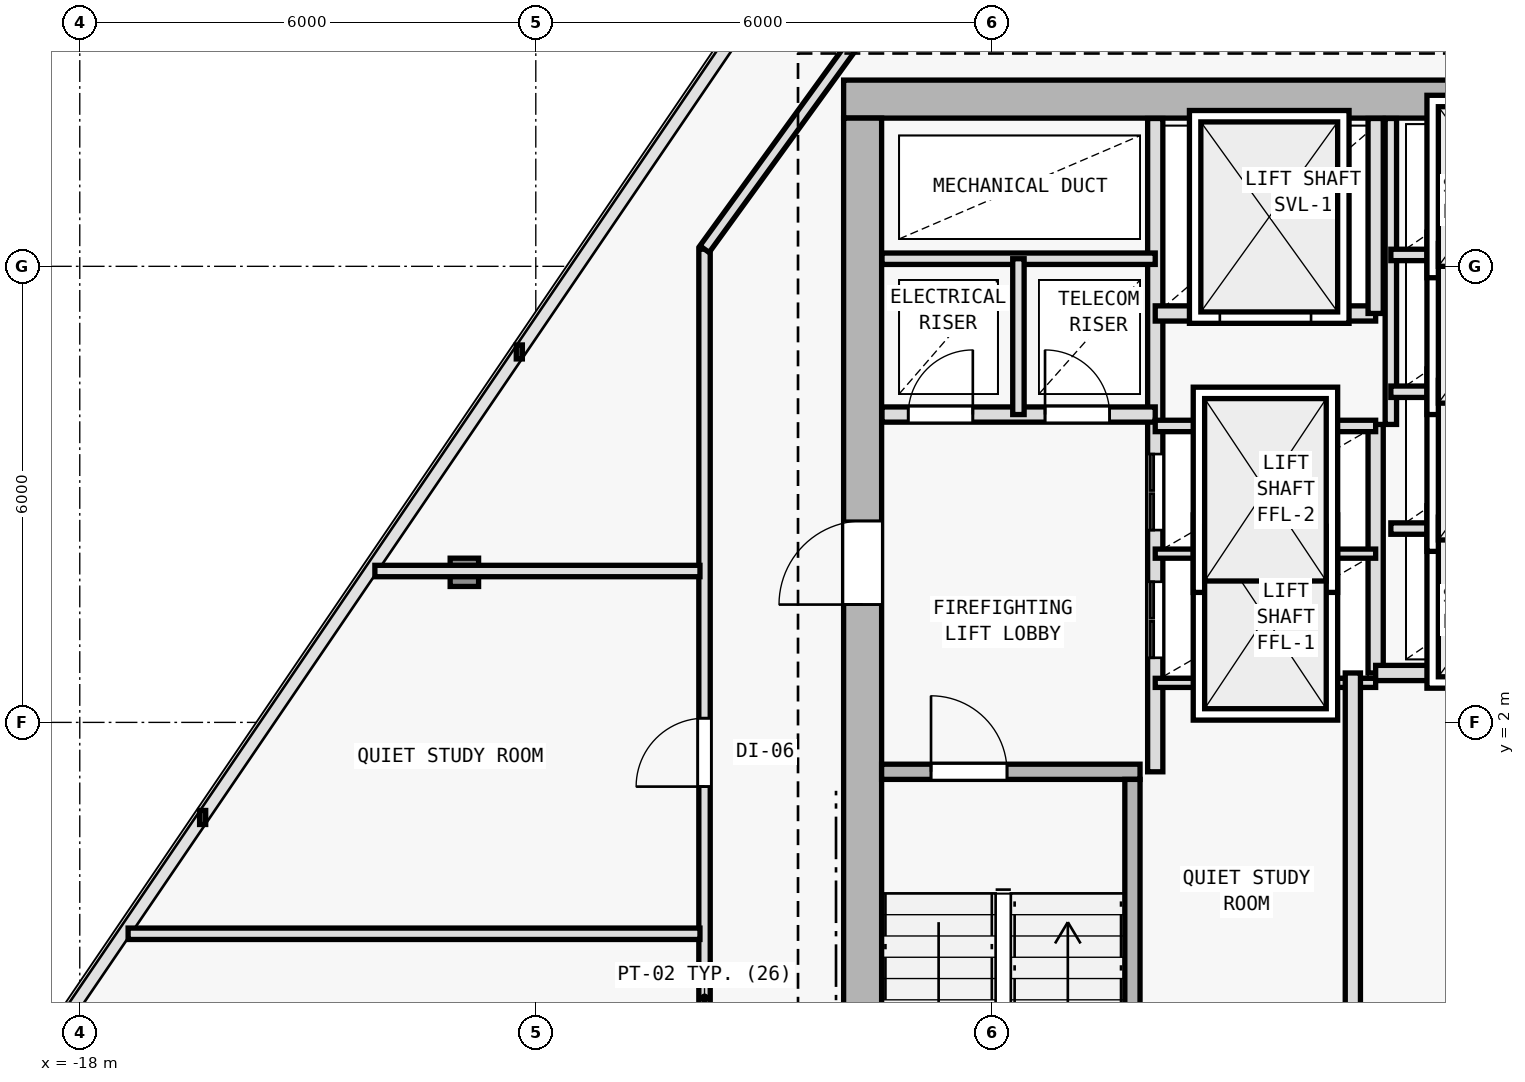
"""IFC4 building model, lengths in metres.
Left out: names, types, materials, properties, quantities, classifications, styles, units other than length and angle.
Written with IfcOpenShell. Run it as: python <this file> out.ifc"""

import sys

from ifc_helpers import new_model, si_unit, direction, frame, frame_2d, origin, origin_2d, place, context, subcontext, project, spatial, rectangle, i_section, extrude, element, fill, save


model = new_model("IFC4")
c1 = context("Model", 3, precision=1e-05, world=origin(), true_north=direction((0.0, 1.0)))
c2 = subcontext(c1, "Body", "Model", "MODEL_VIEW")
j1 = project(units=[si_unit("LENGTHUNIT", "METRE"), si_unit("PLANEANGLEUNIT", "RADIAN")], contexts=[c1])
p1 = place(None, origin())
s1 = spatial("IfcSite", under=j1, at=p1, CompositionType="ELEMENT")
p2 = place(p1, origin())
s2 = spatial("IfcBuilding", under=s1, at=p2, CompositionType="ELEMENT")
p3 = place(p2, frame((0.0, 0.0, 223.5)))
s3 = spatial("IfcBuildingStorey", under=s2, at=p3, CompositionType="ELEMENT", Elevation=223.5)
for number, where, z_axis, x_axis in (
    (1, (-7.7, 10.2, 0.0), (0.0, 0.0, 1.0), (1.0, 0.0, 0.0)),
    (2, (-7.7, 2.0, 0.0), (0.0, 0.0, 1.0), (1.0, 0.0, 0.0)),
):
    element("IfcColumn", number, at=place(p3, frame(where, z_axis=z_axis, x_axis=x_axis)), inside=s3, PredefinedType="COLUMN", context=c2, shape_type="SweptSolid", body=[
        extrude(i_section(OverallWidth=0.398, OverallDepth=0.387, WebThickness=0.013, FlangeThickness=0.022, FilletRadius=0.015, at=origin_2d()), origin(), (0.0, 0.0, 1.0), 3.6),
    ])
p4 = place(p3, frame((-12.94, 3.974, 0.006), z_axis=(0.017003572908, 0.009522000828, 0.999810086971), x_axis=(-0.488603368932, 0.87250601595, 0.0)))
e3 = element("IfcColumn", 3, at=p4, inside=s3, PredefinedType="COLUMN", context=c2, shape_type="SweptSolid", body=[
    extrude(i_section(OverallWidth=0.374, OverallDepth=0.372, WebThickness=0.012, FlangeThickness=0.02, FilletRadius=0.015, at=origin_2d()), origin(), (0.0, 0.0, 1.0), 3.59),
])
p5 = place(p3, frame((7.95, 10.2, 0.0), z_axis=(0.0, 0.0, 1.0), x_axis=(-1.0, 0.0, 0.0)))
e4 = element("IfcWall", 4, at=p5, inside=s3, PredefinedType="SHEAR", context=c2, shape_type="SweptSolid", body=[
    extrude(rectangle(XDim=15.9, YDim=0.5, at=frame_2d((7.95, 0.0))), origin(), (0.0, 0.0, 1.0), 3.35),
])
p6 = place(p5, frame((4.4, 0.0, 0.0)))
e5 = element("IfcOpeningElement", 5, at=p6, cuts=e4, PredefinedType="OPENING", context=c2, shape_type="SweptSolid", body=[
    extrude(rectangle(XDim=1.1, YDim=2.15, at=frame_2d((0.55, 1.075))), frame((0.0, 0.26, 0.0), z_axis=(0.0, -1.0, 0.0), x_axis=(1.0, 0.0, 0.0)), (0.0, 0.0, 1.0), 0.52),
])
p7 = place(p3, frame((-7.7, -9.15, 0.0), z_axis=(0.0, 0.0, 1.0), x_axis=(0.0, 1.0, 0.0)))
e6 = element("IfcWall", 6, at=p7, inside=s3, PredefinedType="SHEAR", context=c2, shape_type="SweptSolid", body=[
    extrude(rectangle(XDim=19.1, YDim=0.5, at=frame_2d((9.55, 0.0))), origin(), (0.0, 0.0, 1.0), 3.35),
])
p8 = place(p7, frame((12.7, 0.0, 0.0)))
e7 = element("IfcOpeningElement", 7, at=p8, cuts=e6, PredefinedType="OPENING", context=c2, shape_type="SweptSolid", body=[
    extrude(rectangle(XDim=1.1, YDim=2.15, at=frame_2d((0.55, 1.075))), frame((0.0, 0.26, 0.0), z_axis=(0.0, -1.0, 0.0), x_axis=(1.0, 0.0, 0.0)), (0.0, 0.0, 1.0), 0.52),
])
p9 = place(p3, frame((-7.45, 1.35, 0.0), z_axis=(0.0, 0.0, 1.0), x_axis=(1.0, 0.0, 0.0)))
e8 = element("IfcWall", 8, at=p9, inside=s3, PredefinedType="SOLIDWALL", context=c2, shape_type="SweptSolid", body=[
    extrude(rectangle(XDim=3.4, YDim=0.2, at=frame_2d((1.7, 0.0))), origin(), (0.0, 0.0, 1.0), 3.35),
])
p10 = place(p9, frame((0.65, 0.0, 0.0)))
e9 = element("IfcOpeningElement", 9, at=p10, cuts=e8, PredefinedType="OPENING", context=c2, shape_type="SweptSolid", body=[
    extrude(rectangle(XDim=1.0, YDim=2.15, at=frame_2d((0.5, 1.075))), frame((0.0, 0.11, 0.0), z_axis=(0.0, -1.0, 0.0), x_axis=(1.0, 0.0, 0.0)), (0.0, 0.0, 1.0), 0.22),
])
p11 = place(p3, frame((-4.15, -5.95, 0.0), z_axis=(0.0, 0.0, 1.0), x_axis=(0.0, 1.0, 0.0)))
e10 = element("IfcWall", 10, at=p11, inside=s3, PredefinedType="SOLIDWALL", context=c2, shape_type="SweptSolid", body=[
    extrude(rectangle(XDim=7.2, YDim=0.2, at=frame_2d((3.6, 0.0))), origin(), (0.0, 0.0, 1.0), 3.35),
])
p12 = place(p3, frame((-3.85, 1.35, 0.0), z_axis=(0.0, 0.0, 1.0), x_axis=(0.0, 1.0, 0.0)))
e11 = element("IfcWall", 11, at=p12, inside=s3, PredefinedType="SOLIDWALL", context=c2, shape_type="SweptSolid", body=[
    extrude(rectangle(XDim=8.595, YDim=0.2, at=frame_2d((4.297, 0.0))), origin(), (0.0, 0.0, 1.0), 3.35),
])
p13 = place(p12, frame((1.5, 0.0, 0.0)))
e12 = element("IfcOpeningElement", 12, at=p13, cuts=e11, PredefinedType="OPENING", context=c2, shape_type="SweptSolid", body=[
    extrude(rectangle(XDim=1.0, YDim=2.15, at=frame_2d((0.5, 1.075))), frame((0.0, 0.11, 0.0), z_axis=(0.0, -1.0, 0.0), x_axis=(1.0, 0.0, 0.0)), (0.0, 0.0, 1.0), 0.22),
])
p14 = place(p12, frame((3.18, 0.0, 0.0)))
e13 = element("IfcOpeningElement", 13, at=p14, cuts=e11, PredefinedType="OPENING", context=c2, shape_type="SweptSolid", body=[
    extrude(rectangle(XDim=1.0, YDim=2.15, at=frame_2d((0.5, 1.075))), frame((0.0, 0.11, 0.0), z_axis=(0.0, -1.0, 0.0), x_axis=(1.0, 0.0, 0.0)), (0.0, 0.0, 1.0), 0.22),
])
p15 = place(p3, frame((-7.445, 6.05, 0.0), z_axis=(0.0, 0.0, 1.0), x_axis=(1.0, 0.0, 0.0)))
e14 = element("IfcWall", 14, at=p15, inside=s3, PredefinedType="SOLIDWALL", context=c2, shape_type="SweptSolid", body=[
    extrude(rectangle(XDim=3.595, YDim=0.2, at=frame_2d((1.797, 0.0))), origin(), (0.0, 0.0, 1.0), 3.35),
])
p16 = place(p15, frame((0.345, 0.0, 0.0)))
e15 = element("IfcOpeningElement", 15, at=p16, cuts=e14, PredefinedType="OPENING", context=c2, shape_type="SweptSolid", body=[
    extrude(rectangle(XDim=0.85, YDim=2.1, at=frame_2d((0.425, 1.05))), frame((0.0, 0.11, 0.0), z_axis=(0.0, -1.0, 0.0), x_axis=(1.0, 0.0, 0.0)), (0.0, 0.0, 1.0), 0.22),
])
p17 = place(p15, frame((2.145, 0.0, 0.0)))
e16 = element("IfcOpeningElement", 16, at=p17, cuts=e14, PredefinedType="OPENING", context=c2, shape_type="SweptSolid", body=[
    extrude(rectangle(XDim=0.85, YDim=2.1, at=frame_2d((0.425, 1.05))), frame((0.0, 0.11, 0.0), z_axis=(0.0, -1.0, 0.0), x_axis=(1.0, 0.0, 0.0)), (0.0, 0.0, 1.0), 0.22),
])
p18 = place(p3, frame((-7.445, 8.1, 0.0), z_axis=(0.0, 0.0, 1.0), x_axis=(1.0, 0.0, 0.0)))
e17 = element("IfcWall", 17, at=p18, inside=s3, PredefinedType="PARTITIONING", context=c2, shape_type="SweptSolid", body=[
    extrude(rectangle(XDim=3.595, YDim=0.15, at=frame_2d((1.797, 0.0))), origin(), (0.0, 0.0, 1.0), 3.35),
])
p19 = place(p3, frame((-5.65, 6.05, 0.0), z_axis=(0.0, 0.0, 1.0), x_axis=(0.0, 1.0, 0.0)))
e18 = element("IfcWall", 18, at=p19, inside=s3, PredefinedType="PARTITIONING", context=c2, shape_type="SweptSolid", body=[
    extrude(rectangle(XDim=2.05, YDim=0.15, at=frame_2d((1.025, 0.0))), origin(), (0.0, 0.0, 1.0), 3.35),
])
p20 = place(p3, frame((-0.95, 2.65, 0.0), z_axis=(0.0, 0.0, 1.0), x_axis=(0.0, 1.0, 0.0)))
e19 = element("IfcWall", 19, at=p20, inside=s3, PredefinedType="SOLIDWALL", context=c2, shape_type="SweptSolid", body=[
    extrude(rectangle(XDim=3.27, YDim=0.2, at=frame_2d((1.635, 0.0))), origin(), (0.0, 0.0, 1.0), 3.35),
])
for number, where, z_axis, x_axis in (
    (20, (-3.85, 2.52, 0.0), (0.0, 0.0, 1.0), (1.0, 0.0, 0.0)),
    (21, (-3.85, 4.22, 0.0), (0.0, 0.0, 1.0), (1.0, 0.0, 0.0)),
):
    element("IfcWall", number, at=place(p3, frame(where, z_axis=z_axis, x_axis=x_axis)), inside=s3, PredefinedType="PARTITIONING", context=c2, shape_type="SweptSolid", body=[
        extrude(rectangle(XDim=2.9, YDim=0.12, at=frame_2d((1.45, 0.0))), origin(), (0.0, 0.0, 1.0), 3.35),
    ])
p21 = place(p3, frame((-3.85, 5.9, 0.0), z_axis=(0.0, 0.0, 1.0), x_axis=(1.0, 0.0, 0.0)))
e22 = element("IfcWall", 22, at=p21, inside=s3, PredefinedType="PARTITIONING", context=c2, shape_type="SweptSolid", body=[
    extrude(rectangle(XDim=2.9, YDim=0.15, at=frame_2d((1.45, 0.0))), origin(), (0.0, 0.0, 1.0), 3.35),
])
p22 = place(p3, frame((-3.85, 7.38, 0.0), z_axis=(0.0, 0.0, 1.0), x_axis=(1.0, 0.0, 0.0)))
e23 = element("IfcWall", 23, at=p22, inside=s3, PredefinedType="SOLIDWALL", context=c2, shape_type="SweptSolid", body=[
    extrude(rectangle(XDim=2.9, YDim=0.2, at=frame_2d((1.45, 0.0))), origin(), (0.0, 0.0, 1.0), 3.35),
])
p23 = place(p22, frame((0.85, 0.0, 0.0)))
e24 = element("IfcOpeningElement", 24, at=p23, cuts=e23, PredefinedType="OPENING", context=c2, shape_type="SweptSolid", body=[
    extrude(rectangle(XDim=1.2, YDim=2.2, at=frame_2d((0.6, 1.1))), frame((0.0, 0.11, 0.0), z_axis=(0.0, -1.0, 0.0), x_axis=(1.0, 0.0, 0.0)), (0.0, 0.0, 1.0), 0.22),
])
p24 = place(p3, frame((-0.95, 7.38, 0.0), z_axis=(0.0, 0.0, 1.0), x_axis=(0.0, 1.0, 0.0)))
e25 = element("IfcWall", 25, at=p24, inside=s3, PredefinedType="SOLIDWALL", context=c2, shape_type="SweptSolid", body=[
    extrude(rectangle(XDim=2.565, YDim=0.2, at=frame_2d((1.283, 0.0))), origin(), (0.0, 0.0, 1.0), 3.35),
])
p25 = place(p3, frame((-1.25, -6.05, 0.0), z_axis=(0.0, 0.0, 1.0), x_axis=(0.0, 1.0, 0.0)))
e26 = element("IfcWall", 26, at=p25, inside=s3, PredefinedType="SOLIDWALL", context=c2, shape_type="SweptSolid", body=[
    extrude(rectangle(XDim=8.7, YDim=0.2, at=frame_2d((4.35, 0.0))), origin(), (0.0, 0.0, 1.0), 3.35),
])
p26 = place(p25, frame((3.4, 0.0, 0.0)))
e27 = element("IfcOpeningElement", 27, at=p26, cuts=e26, PredefinedType="OPENING", context=c2, shape_type="SweptSolid", body=[
    extrude(rectangle(XDim=0.95, YDim=2.1, at=frame_2d((0.475, 1.05))), frame((0.0, 0.11, 0.0), z_axis=(0.0, -1.0, 0.0), x_axis=(1.0, 0.0, 0.0)), (0.0, 0.0, 1.0), 0.22),
])
p27 = place(p3, frame((-0.95, 2.65, 0.0), z_axis=(0.0, 0.0, 1.0), x_axis=(1.0, 0.0, 0.0)))
e28 = element("IfcWall", 28, at=p27, inside=s3, PredefinedType="SOLIDWALL", context=c2, shape_type="SweptSolid", body=[
    extrude(rectangle(XDim=2.9, YDim=0.2, at=frame_2d((1.45, 0.0))), origin(), (0.0, 0.0, 1.0), 3.35),
])
p28 = place(p3, frame((-0.75, 5.92, 0.0), z_axis=(0.0, 0.0, 1.0), x_axis=(0.0, 1.0, 0.0)))
e29 = element("IfcWall", 29, at=p28, inside=s3, PredefinedType="PARTITIONING", context=c2, shape_type="SweptSolid", body=[
    extrude(rectangle(XDim=4.025, YDim=0.15, at=frame_2d((2.013, 0.0))), origin(), (0.0, 0.0, 1.0), 3.35),
])
for number, where, z_axis, x_axis in (
    (30, (-0.75, 4.55, 0.0), (0.0, 0.0, 1.0), (1.0, 0.0, 0.0)),
    (31, (-0.75, 6.35, 0.0), (0.0, 0.0, 1.0), (1.0, 0.0, 0.0)),
    (32, (-0.75, 8.15, 0.0), (0.0, 0.0, 1.0), (1.0, 0.0, 0.0)),
):
    element("IfcWall", number, at=place(p3, frame(where, z_axis=z_axis, x_axis=x_axis)), inside=s3, PredefinedType="PARTITIONING", context=c2, shape_type="SweptSolid", body=[
        extrude(rectangle(XDim=2.7, YDim=0.15, at=frame_2d((1.35, 0.0))), origin(), (0.0, 0.0, 1.0), 3.35),
    ])
p29 = place(p3, frame((-9.78, -11.48, 0.0), z_axis=(0.0, 0.0, 1.0), x_axis=(0.0, 1.0, 0.0)))
e33 = element("IfcWall", 33, at=p29, inside=s3, PredefinedType="PARTITIONING", context=c2, shape_type="SweptSolid", body=[
    extrude(rectangle(XDim=19.706, YDim=0.15, at=frame_2d((9.853, 0.0))), origin(), (0.0, 0.0, 1.0), 2.825),
])
p30 = place(p29, frame((7.775, 0.0, 0.0)))
e34 = element("IfcOpeningElement", 34, at=p30, cuts=e33, PredefinedType="OPENING", context=c2, shape_type="SweptSolid", body=[
    extrude(rectangle(XDim=0.9, YDim=2.1, at=frame_2d((0.45, 1.05))), frame((0.0, 0.085, 0.0), z_axis=(0.0, -1.0, 0.0), x_axis=(1.0, 0.0, 0.0)), (0.0, 0.0, 1.0), 0.17),
])
p31 = place(p29, frame((2.515, 0.0, 0.0)))
e35 = element("IfcOpeningElement", 35, at=p31, cuts=e33, PredefinedType="OPENING", context=c2, shape_type="SweptSolid", body=[
    extrude(rectangle(XDim=0.9, YDim=2.1, at=frame_2d((0.45, 1.05))), frame((0.0, 0.085, 0.0), z_axis=(0.0, -1.0, 0.0), x_axis=(1.0, 0.0, 0.0)), (0.0, 0.0, 1.0), 0.17),
])
p32 = place(p29, frame((12.635, 0.0, 0.0)))
e36 = element("IfcOpeningElement", 36, at=p32, cuts=e33, PredefinedType="OPENING", context=c2, shape_type="SweptSolid", body=[
    extrude(rectangle(XDim=0.9, YDim=2.1, at=frame_2d((0.45, 1.05))), frame((0.0, 0.085, 0.0), z_axis=(0.0, -1.0, 0.0), x_axis=(1.0, 0.0, 0.0)), (0.0, 0.0, 1.0), 0.17),
])
p33 = place(p3, frame((-9.78, 8.226, 0.0), z_axis=(0.0, 0.0, 1.0), x_axis=(0.586956386413, 0.809618552436, 0.0)))
e37 = element("IfcWall", 37, at=p33, inside=s3, PredefinedType="PARTITIONING", context=c2, shape_type="SweptSolid", body=[
    extrude(rectangle(XDim=5.008, YDim=0.15, at=frame_2d((2.504, 0.0))), origin(), (0.0, 0.0, 1.0), 2.975),
])
p34 = place(p3, frame((-9.84, 3.991, 0.0), z_axis=(0.0, 0.0, 1.0), x_axis=(-1.0, 0.0, 0.0)))
e38 = element("IfcWall", 38, at=p34, inside=s3, PredefinedType="PARTITIONING", context=c2, shape_type="SweptSolid", body=[
    extrude(rectangle(XDim=4.277, YDim=0.15, at=frame_2d((2.139, 0.0))), origin(), (0.0, 0.0, 1.0), 2.975),
])
p35 = place(p3, frame((-9.84, -0.781, 0.0), z_axis=(0.0, 0.0, 1.0), x_axis=(-1.0, 0.0, 0.0)))
e39 = element("IfcWall", 39, at=p35, inside=s3, PredefinedType="PARTITIONING", context=c2, shape_type="SweptSolid", body=[
    extrude(rectangle(XDim=7.524, YDim=0.15, at=frame_2d((3.762, 0.0))), origin(), (0.0, 0.0, 1.0), 2.975),
])
p36 = place(p8, origin())
e40 = element("IfcDoor", 40, at=p36, inside=s3, OperationType="SINGLE_SWING_LEFT", PredefinedType="DOOR", context=c2, shape_type="SweptSolid", body=[
    extrude(rectangle(XDim=1.1, YDim=2.15, at=frame_2d((0.55, 1.075))), frame((0.0, 0.025, 0.0), z_axis=(0.0, -1.0, 0.0), x_axis=(1.0, 0.0, 0.0)), (0.0, 0.0, 1.0), 0.05),
])
fill(e7, e40)
p37 = place(p10, origin())
e41 = element("IfcDoor", 41, at=p37, inside=s3, OperationType="SINGLE_SWING_LEFT", PredefinedType="DOOR", context=c2, shape_type="SweptSolid", body=[
    extrude(rectangle(XDim=1.0, YDim=2.15, at=frame_2d((0.5, 1.075))), frame((0.0, 0.025, 0.0), z_axis=(0.0, -1.0, 0.0), x_axis=(1.0, 0.0, 0.0)), (0.0, 0.0, 1.0), 0.05),
])
fill(e9, e41)
p38 = place(p16, origin())
e42 = element("IfcDoor", 42, at=p38, inside=s3, OperationType="SINGLE_SWING_RIGHT", PredefinedType="DOOR", context=c2, shape_type="SweptSolid", body=[
    extrude(rectangle(XDim=0.85, YDim=2.1, at=frame_2d((0.425, 1.05))), frame((0.0, 0.025, 0.0), z_axis=(0.0, -1.0, 0.0), x_axis=(1.0, 0.0, 0.0)), (0.0, 0.0, 1.0), 0.05),
])
fill(e15, e42)
p39 = place(p17, origin())
e43 = element("IfcDoor", 43, at=p39, inside=s3, OperationType="SINGLE_SWING_LEFT", PredefinedType="DOOR", context=c2, shape_type="SweptSolid", body=[
    extrude(rectangle(XDim=0.85, YDim=2.1, at=frame_2d((0.425, 1.05))), frame((0.0, 0.025, 0.0), z_axis=(0.0, -1.0, 0.0), x_axis=(1.0, 0.0, 0.0)), (0.0, 0.0, 1.0), 0.05),
])
fill(e16, e43)
p40 = place(p23, origin())
e44 = element("IfcDoor", 44, at=p40, inside=s3, OperationType="DOUBLE_DOOR_SLIDING", PredefinedType="DOOR", context=c2, shape_type="SweptSolid", body=[
    extrude(rectangle(XDim=1.2, YDim=2.2, at=frame_2d((0.6, 1.1))), frame((0.0, 0.025, 0.0), z_axis=(0.0, -1.0, 0.0), x_axis=(1.0, 0.0, 0.0)), (0.0, 0.0, 1.0), 0.05),
])
fill(e24, e44)
p41 = place(p13, origin())
e45 = element("IfcDoor", 45, at=p41, inside=s3, OperationType="DOUBLE_DOOR_SLIDING", PredefinedType="DOOR", context=c2, shape_type="SweptSolid", body=[
    extrude(rectangle(XDim=1.0, YDim=2.15, at=frame_2d((0.5, 1.075))), frame((0.0, 0.025, 0.0), z_axis=(0.0, -1.0, 0.0), x_axis=(1.0, 0.0, 0.0)), (0.0, 0.0, 1.0), 0.05),
])
fill(e12, e45)
p42 = place(p14, origin())
e46 = element("IfcDoor", 46, at=p42, inside=s3, OperationType="DOUBLE_DOOR_SLIDING", PredefinedType="DOOR", context=c2, shape_type="SweptSolid", body=[
    extrude(rectangle(XDim=1.0, YDim=2.15, at=frame_2d((0.5, 1.075))), frame((0.0, 0.025, 0.0), z_axis=(0.0, -1.0, 0.0), x_axis=(1.0, 0.0, 0.0)), (0.0, 0.0, 1.0), 0.05),
])
fill(e13, e46)
p43 = place(p32, origin())
e47 = element("IfcDoor", 47, at=p43, inside=s3, OperationType="SINGLE_SWING_LEFT", PredefinedType="DOOR", context=c2, shape_type="SweptSolid", body=[
    extrude(rectangle(XDim=0.9, YDim=2.1, at=frame_2d((0.45, 1.05))), frame((0.0, 0.025, 0.0), z_axis=(0.0, -1.0, 0.0), x_axis=(1.0, 0.0, 0.0)), (0.0, 0.0, 1.0), 0.05),
])
fill(e36, e47)
save(model, sys.argv[1])
